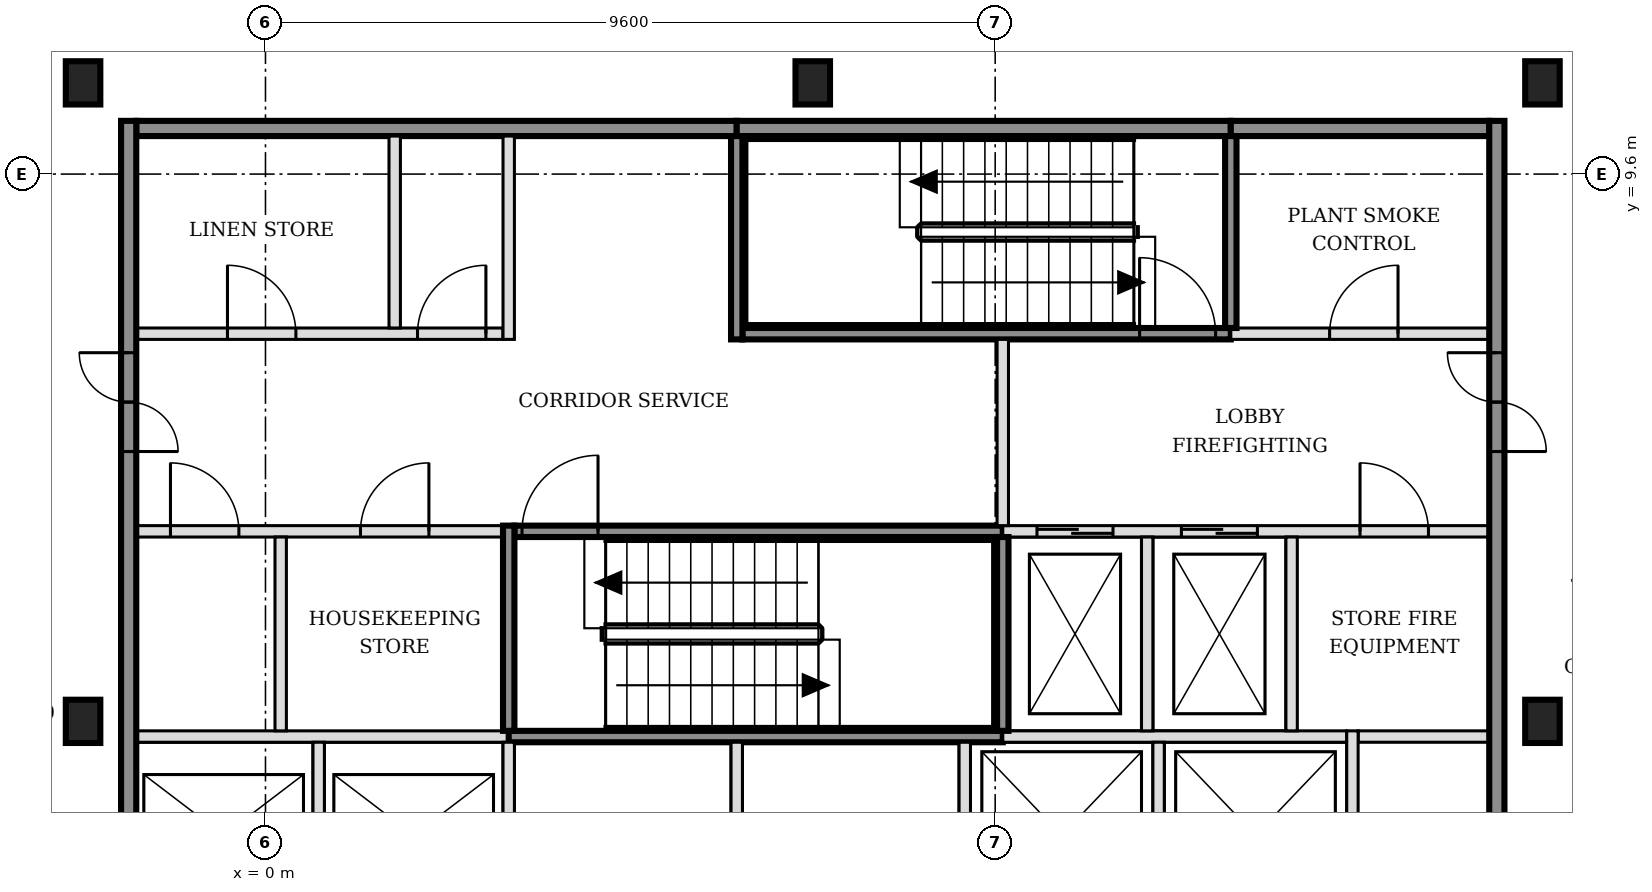
"""IFC4 building model, lengths in metres.
Left out: names, types, materials, properties, quantities, classifications, styles, units other than length and angle.
Written with IfcOpenShell. Run it as: python <this file> out.ifc"""

import sys

from ifc_helpers import new_model, si_unit, direction, frame, frame_2d, origin, origin_2d, place, context, subcontext, project, spatial, rectangle, i_section, extrude, element, fill, save


model = new_model("IFC4")
c1 = context("Model", 3, precision=1e-05, world=origin(), true_north=direction((0.0, 1.0)))
c2 = subcontext(c1, "Body", "Model", "MODEL_VIEW")
j1 = project(units=[si_unit("LENGTHUNIT", "METRE"), si_unit("PLANEANGLEUNIT", "RADIAN")], contexts=[c1])
p1 = place(None, origin())
s1 = spatial("IfcSite", under=j1, at=p1, CompositionType="ELEMENT")
p2 = place(p1, origin())
s2 = spatial("IfcBuilding", under=s1, at=p2, CompositionType="ELEMENT")
p3 = place(p2, frame((0.0, 0.0, 54.6)))
s3 = spatial("IfcBuildingStorey", under=s2, at=p3, CompositionType="ELEMENT", Elevation=54.6)
for number, where, z_axis, x_axis in (
    (1, (-2.4, 2.4, -0.15), (0.0, 0.0, 1.0), (1.0, 0.0, 0.0)),
    (2, (16.8, 2.4, -0.15), (0.0, 0.0, 1.0), (1.0, 0.0, 0.0)),
    (3, (-2.4, 10.8, -0.15), (0.0, 0.0, 1.0), (1.0, 0.0, 0.0)),
    (4, (7.2, 10.8, -0.15), (0.0, 0.0, 1.0), (1.0, 0.0, 0.0)),
    (5, (16.8, 10.8, -0.15), (0.0, 0.0, 1.0), (1.0, 0.0, 0.0)),
):
    element("IfcColumn", number, at=place(p3, frame(where, z_axis=z_axis, x_axis=x_axis)), inside=s3, PredefinedType="COLUMN", context=c2, shape_type="SweptSolid", body=[
        extrude(i_section(OverallWidth=0.454, OverallDepth=0.569, WebThickness=0.078, FlangeThickness=0.125, FilletRadius=0.015, at=origin_2d()), origin(), (0.0, 0.0, 1.0), 3.6),
    ])
p4 = place(p3, frame((-1.7, 2.2, 0.0), z_axis=(0.0, 0.0, 1.0), x_axis=(1.0, 0.0, 0.0)))
e6 = element("IfcWall", 6, at=p4, inside=s3, PredefinedType="SOLIDWALL", context=c2, shape_type="SweptSolid", body=[
    extrude(rectangle(XDim=4.9, YDim=0.15, at=frame_2d((2.45, 0.0))), origin(), (0.0, 0.0, 1.0), 3.45),
])
p5 = place(p3, frame((3.2, 2.2, 0.0), z_axis=(0.0, 0.0, 1.0), x_axis=(1.0, 0.0, 0.0)))
e7 = element("IfcWall", 7, at=p5, inside=s3, PredefinedType="SOLIDWALL", context=c2, shape_type="SweptSolid", body=[
    extrude(rectangle(XDim=6.5, YDim=0.15, at=frame_2d((3.25, 0.0))), origin(), (0.0, 0.0, 1.0), 3.45),
])
p6 = place(p3, frame((9.7, 2.2, 0.0), z_axis=(0.0, 0.0, 1.0), x_axis=(1.0, 0.0, 0.0)))
e8 = element("IfcWall", 8, at=p6, inside=s3, PredefinedType="SOLIDWALL", context=c2, shape_type="SweptSolid", body=[
    extrude(rectangle(XDim=4.525, YDim=0.15, at=frame_2d((2.263, 0.0))), origin(), (0.0, 0.0, 1.0), 3.45),
])
p7 = place(p3, frame((14.375, 2.2, 0.0), z_axis=(0.0, 0.0, 1.0), x_axis=(1.0, 0.0, 0.0)))
e9 = element("IfcWall", 9, at=p7, inside=s3, PredefinedType="PARTITIONING", context=c2, shape_type="SweptSolid", body=[
    extrude(rectangle(XDim=1.725, YDim=0.15, at=frame_2d((0.863, 0.0))), origin(), (0.0, 0.0, 1.0), 3.45),
])
p8 = place(p3, frame((-1.7, 4.9, 0.0), z_axis=(0.0, 0.0, 1.0), x_axis=(1.0, 0.0, 0.0)))
e10 = element("IfcWall", 10, at=p8, inside=s3, PredefinedType="PARTITIONING", context=c2, shape_type="SweptSolid", body=[
    extrude(rectangle(XDim=4.825, YDim=0.15, at=frame_2d((2.413, 0.0))), origin(), (0.0, 0.0, 1.0), 3.45),
])
p9 = place(p8, frame((0.45, 0.0, 0.0)))
e11 = element("IfcOpeningElement", 11, at=p9, cuts=e10, PredefinedType="OPENING", context=c2, shape_type="SweptSolid", body=[
    extrude(rectangle(XDim=0.9, YDim=2.1, at=frame_2d((0.45, 1.05))), frame((0.0, 0.085, 0.0), z_axis=(0.0, -1.0, 0.0), x_axis=(1.0, 0.0, 0.0)), (0.0, 0.0, 1.0), 0.17),
])
p10 = place(p8, frame((2.95, 0.0, 0.0)))
e12 = element("IfcOpeningElement", 12, at=p10, cuts=e10, PredefinedType="OPENING", context=c2, shape_type="SweptSolid", body=[
    extrude(rectangle(XDim=0.9, YDim=2.1, at=frame_2d((0.45, 1.05))), frame((0.0, 0.085, 0.0), z_axis=(0.0, -1.0, 0.0), x_axis=(1.0, 0.0, 0.0)), (0.0, 0.0, 1.0), 0.17),
])
p11 = place(p3, frame((3.275, 4.9, 0.0), z_axis=(0.0, 0.0, 1.0), x_axis=(1.0, 0.0, 0.0)))
e13 = element("IfcWall", 13, at=p11, inside=s3, PredefinedType="SOLIDWALL", context=c2, shape_type="SweptSolid", body=[
    extrude(rectangle(XDim=6.425, YDim=0.15, at=frame_2d((3.212, 0.0))), origin(), (0.0, 0.0, 1.0), 3.45),
])
p12 = place(p11, frame((0.1, 0.0, 0.0)))
e14 = element("IfcOpeningElement", 14, at=p12, cuts=e13, PredefinedType="OPENING", context=c2, shape_type="SweptSolid", body=[
    extrude(rectangle(XDim=1.0, YDim=2.1, at=frame_2d((0.5, 1.05))), frame((0.0, 0.085, 0.0), z_axis=(0.0, -1.0, 0.0), x_axis=(1.0, 0.0, 0.0)), (0.0, 0.0, 1.0), 0.17),
])
p13 = place(p3, frame((9.7, 4.9, 0.0), z_axis=(0.0, 0.0, 1.0), x_axis=(1.0, 0.0, 0.0)))
e15 = element("IfcWall", 15, at=p13, inside=s3, PredefinedType="SOLIDWALL", context=c2, shape_type="SweptSolid", body=[
    extrude(rectangle(XDim=6.4, YDim=0.15, at=frame_2d((3.2, 0.0))), origin(), (0.0, 0.0, 1.0), 3.45),
])
p14 = place(p13, frame((0.45, 0.0, 0.0)))
e16 = element("IfcOpeningElement", 16, at=p14, cuts=e15, PredefinedType="OPENING", context=c2, shape_type="SweptSolid", body=[
    extrude(rectangle(XDim=1.0, YDim=2.1, at=frame_2d((0.5, 1.05))), frame((0.0, 0.085, 0.0), z_axis=(0.0, -1.0, 0.0), x_axis=(1.0, 0.0, 0.0)), (0.0, 0.0, 1.0), 0.17),
])
p15 = place(p13, frame((2.35, 0.0, 0.0)))
e17 = element("IfcOpeningElement", 17, at=p15, cuts=e15, PredefinedType="OPENING", context=c2, shape_type="SweptSolid", body=[
    extrude(rectangle(XDim=1.0, YDim=2.1, at=frame_2d((0.5, 1.05))), frame((0.0, 0.085, 0.0), z_axis=(0.0, -1.0, 0.0), x_axis=(1.0, 0.0, 0.0)), (0.0, 0.0, 1.0), 0.17),
])
p16 = place(p13, frame((4.7, 0.0, 0.0)))
e18 = element("IfcOpeningElement", 18, at=p16, cuts=e15, PredefinedType="OPENING", context=c2, shape_type="SweptSolid", body=[
    extrude(rectangle(XDim=0.9, YDim=2.1, at=frame_2d((0.45, 1.05))), frame((0.0, 0.085, 0.0), z_axis=(0.0, -1.0, 0.0), x_axis=(1.0, 0.0, 0.0)), (0.0, 0.0, 1.0), 0.17),
])
p17 = place(p3, frame((-1.7, 7.5, 0.0), z_axis=(0.0, 0.0, 1.0), x_axis=(1.0, 0.0, 0.0)))
e19 = element("IfcWall", 19, at=p17, inside=s3, PredefinedType="PARTITIONING", context=c2, shape_type="SweptSolid", body=[
    extrude(rectangle(XDim=4.825, YDim=0.15, at=frame_2d((2.413, 0.0))), origin(), (0.0, 0.0, 1.0), 3.45),
])
p18 = place(p17, frame((1.2, 0.0, 0.0)))
e20 = element("IfcOpeningElement", 20, at=p18, cuts=e19, PredefinedType="OPENING", context=c2, shape_type="SweptSolid", body=[
    extrude(rectangle(XDim=0.9, YDim=2.1, at=frame_2d((0.45, 1.05))), frame((0.0, 0.085, 0.0), z_axis=(0.0, -1.0, 0.0), x_axis=(1.0, 0.0, 0.0)), (0.0, 0.0, 1.0), 0.17),
])
p19 = place(p17, frame((3.7, 0.0, 0.0)))
e21 = element("IfcOpeningElement", 21, at=p19, cuts=e19, PredefinedType="OPENING", context=c2, shape_type="SweptSolid", body=[
    extrude(rectangle(XDim=0.9, YDim=2.1, at=frame_2d((0.45, 1.05))), frame((0.0, 0.085, 0.0), z_axis=(0.0, -1.0, 0.0), x_axis=(1.0, 0.0, 0.0)), (0.0, 0.0, 1.0), 0.17),
])
p20 = place(p3, frame((6.275, 7.5, 0.0), z_axis=(0.0, 0.0, 1.0), x_axis=(1.0, 0.0, 0.0)))
e22 = element("IfcWall", 22, at=p20, inside=s3, PredefinedType="SOLIDWALL", context=c2, shape_type="SweptSolid", body=[
    extrude(rectangle(XDim=6.425, YDim=0.15, at=frame_2d((3.212, 0.0))), origin(), (0.0, 0.0, 1.0), 3.45),
])
p21 = place(p20, frame((5.225, 0.0, 0.0)))
e23 = element("IfcOpeningElement", 23, at=p21, cuts=e22, PredefinedType="OPENING", context=c2, shape_type="SweptSolid", body=[
    extrude(rectangle(XDim=1.0, YDim=2.1, at=frame_2d((0.5, 1.05))), frame((0.0, 0.085, 0.0), z_axis=(0.0, -1.0, 0.0), x_axis=(1.0, 0.0, 0.0)), (0.0, 0.0, 1.0), 0.17),
])
p22 = place(p3, frame((12.7, 7.5, 0.0), z_axis=(0.0, 0.0, 1.0), x_axis=(1.0, 0.0, 0.0)))
e24 = element("IfcWall", 24, at=p22, inside=s3, PredefinedType="SOLIDWALL", context=c2, shape_type="SweptSolid", body=[
    extrude(rectangle(XDim=3.4, YDim=0.15, at=frame_2d((1.7, 0.0))), origin(), (0.0, 0.0, 1.0), 3.45),
])
p23 = place(p22, frame((1.3, 0.0, 0.0)))
e25 = element("IfcOpeningElement", 25, at=p23, cuts=e24, PredefinedType="OPENING", context=c2, shape_type="SweptSolid", body=[
    extrude(rectangle(XDim=0.9, YDim=2.1, at=frame_2d((0.45, 1.05))), frame((0.0, 0.085, 0.0), z_axis=(0.0, -1.0, 0.0), x_axis=(1.0, 0.0, 0.0)), (0.0, 0.0, 1.0), 0.17),
])
p24 = place(p3, frame((-1.7, 10.2, 0.0), z_axis=(0.0, 0.0, 1.0), x_axis=(1.0, 0.0, 0.0)))
e26 = element("IfcWall", 26, at=p24, inside=s3, PredefinedType="SOLIDWALL", context=c2, shape_type="SweptSolid", body=[
    extrude(rectangle(XDim=7.9, YDim=0.2, at=frame_2d((3.95, 0.0))), origin(), (0.0, 0.0, 1.0), 3.45),
])
p25 = place(p3, frame((6.2, 10.2, 0.0), z_axis=(0.0, 0.0, 1.0), x_axis=(1.0, 0.0, 0.0)))
e27 = element("IfcWall", 27, at=p25, inside=s3, PredefinedType="SOLIDWALL", context=c2, shape_type="SweptSolid", body=[
    extrude(rectangle(XDim=6.5, YDim=0.2, at=frame_2d((3.25, 0.0))), origin(), (0.0, 0.0, 1.0), 3.45),
])
p26 = place(p3, frame((12.7, 10.2, 0.0), z_axis=(0.0, 0.0, 1.0), x_axis=(1.0, 0.0, 0.0)))
e28 = element("IfcWall", 28, at=p26, inside=s3, PredefinedType="SOLIDWALL", context=c2, shape_type="SweptSolid", body=[
    extrude(rectangle(XDim=3.4, YDim=0.2, at=frame_2d((1.7, 0.0))), origin(), (0.0, 0.0, 1.0), 3.45),
])
p27 = place(p3, frame((-1.8, -5.5, 0.0), z_axis=(0.0, 0.0, 1.0), x_axis=(0.0, 1.0, 0.0)))
e29 = element("IfcWall", 29, at=p27, inside=s3, PredefinedType="SOLIDWALL", context=c2, shape_type="SweptSolid", body=[
    extrude(rectangle(XDim=15.8, YDim=0.2, at=frame_2d((7.9, 0.0))), origin(), (0.0, 0.0, 1.0), 3.45),
])
p28 = place(p27, frame((3.05, 0.0, 0.0)))
e30 = element("IfcOpeningElement", 30, at=p28, cuts=e29, PredefinedType="OPENING", context=c2, shape_type="SweptSolid", body=[
    extrude(rectangle(XDim=1.3, YDim=2.1, at=frame_2d((0.65, 1.05))), frame((0.0, 0.11, 0.0), z_axis=(0.0, -1.0, 0.0), x_axis=(1.0, 0.0, 0.0)), (0.0, 0.0, 1.0), 0.22),
])
p29 = place(p27, frame((11.45, 0.0, 0.0)))
e31 = element("IfcOpeningElement", 31, at=p29, cuts=e29, PredefinedType="OPENING", context=c2, shape_type="SweptSolid", body=[
    extrude(rectangle(XDim=1.3, YDim=2.1, at=frame_2d((0.65, 1.05))), frame((0.0, 0.11, 0.0), z_axis=(0.0, -1.0, 0.0), x_axis=(1.0, 0.0, 0.0)), (0.0, 0.0, 1.0), 0.22),
])
p30 = place(p3, frame((0.2, 2.275, 0.0), z_axis=(0.0, 0.0, 1.0), x_axis=(0.0, 1.0, 0.0)))
e32 = element("IfcWall", 32, at=p30, inside=s3, PredefinedType="PARTITIONING", context=c2, shape_type="SweptSolid", body=[
    extrude(rectangle(XDim=2.55, YDim=0.15, at=frame_2d((1.275, 0.0))), origin(), (0.0, 0.0, 1.0), 3.45),
])
p31 = place(p3, frame((0.7, -0.325, 0.0), z_axis=(0.0, 0.0, 1.0), x_axis=(0.0, 1.0, 0.0)))
e33 = element("IfcWall", 33, at=p31, inside=s3, PredefinedType="SOLIDWALL", context=c2, shape_type="SweptSolid", body=[
    extrude(rectangle(XDim=2.45, YDim=0.15, at=frame_2d((1.225, 0.0))), origin(), (0.0, 0.0, 1.0), 3.45),
])
p32 = place(p3, frame((1.7, 7.575, 0.0), z_axis=(0.0, 0.0, 1.0), x_axis=(0.0, 1.0, 0.0)))
e34 = element("IfcWall", 34, at=p32, inside=s3, PredefinedType="PARTITIONING", context=c2, shape_type="SweptSolid", body=[
    extrude(rectangle(XDim=2.525, YDim=0.15, at=frame_2d((1.263, 0.0))), origin(), (0.0, 0.0, 1.0), 3.45),
])
p33 = place(p3, frame((3.2, -0.325, 0.0), z_axis=(0.0, 0.0, 1.0), x_axis=(0.0, 1.0, 0.0)))
e35 = element("IfcWall", 35, at=p33, inside=s3, PredefinedType="SOLIDWALL", context=c2, shape_type="SweptSolid", body=[
    extrude(rectangle(XDim=2.45, YDim=0.15, at=frame_2d((1.225, 0.0))), origin(), (0.0, 0.0, 1.0), 3.45),
])
p34 = place(p3, frame((3.2, 2.275, 0.0), z_axis=(0.0, 0.0, 1.0), x_axis=(0.0, 1.0, 0.0)))
e36 = element("IfcWall", 36, at=p34, inside=s3, PredefinedType="SOLIDWALL", context=c2, shape_type="SweptSolid", body=[
    extrude(rectangle(XDim=2.7, YDim=0.15, at=frame_2d((1.35, 0.0))), origin(), (0.0, 0.0, 1.0), 3.45),
])
p35 = place(p3, frame((3.2, 7.425, 0.0), z_axis=(0.0, 0.0, 1.0), x_axis=(0.0, 1.0, 0.0)))
e37 = element("IfcWall", 37, at=p35, inside=s3, PredefinedType="PARTITIONING", context=c2, shape_type="SweptSolid", body=[
    extrude(rectangle(XDim=2.675, YDim=0.15, at=frame_2d((1.337, 0.0))), origin(), (0.0, 0.0, 1.0), 3.45),
])
p36 = place(p3, frame((6.2, -0.325, 0.0), z_axis=(0.0, 0.0, 1.0), x_axis=(0.0, 1.0, 0.0)))
e38 = element("IfcWall", 38, at=p36, inside=s3, PredefinedType="SOLIDWALL", context=c2, shape_type="SweptSolid", body=[
    extrude(rectangle(XDim=2.45, YDim=0.15, at=frame_2d((1.225, 0.0))), origin(), (0.0, 0.0, 1.0), 3.45),
])
p37 = place(p3, frame((6.2, 7.425, 0.0), z_axis=(0.0, 0.0, 1.0), x_axis=(0.0, 1.0, 0.0)))
e39 = element("IfcWall", 39, at=p37, inside=s3, PredefinedType="SOLIDWALL", context=c2, shape_type="SweptSolid", body=[
    extrude(rectangle(XDim=2.675, YDim=0.15, at=frame_2d((1.337, 0.0))), origin(), (0.0, 0.0, 1.0), 3.45),
])
p38 = place(p3, frame((9.2, -0.325, 0.0), z_axis=(0.0, 0.0, 1.0), x_axis=(0.0, 1.0, 0.0)))
e40 = element("IfcWall", 40, at=p38, inside=s3, PredefinedType="SOLIDWALL", context=c2, shape_type="SweptSolid", body=[
    extrude(rectangle(XDim=2.45, YDim=0.15, at=frame_2d((1.225, 0.0))), origin(), (0.0, 0.0, 1.0), 3.45),
])
p39 = place(p3, frame((9.7, 2.275, 0.0), z_axis=(0.0, 0.0, 1.0), x_axis=(0.0, 1.0, 0.0)))
e41 = element("IfcWall", 41, at=p39, inside=s3, PredefinedType="SOLIDWALL", context=c2, shape_type="SweptSolid", body=[
    extrude(rectangle(XDim=2.55, YDim=0.15, at=frame_2d((1.275, 0.0))), origin(), (0.0, 0.0, 1.0), 3.45),
])
p40 = place(p3, frame((9.7, 4.975, 0.0), z_axis=(0.0, 0.0, 1.0), x_axis=(0.0, 1.0, 0.0)))
e42 = element("IfcWall", 42, at=p40, inside=s3, PredefinedType="SOLIDWALL", context=c2, shape_type="SweptSolid", body=[
    extrude(rectangle(XDim=2.45, YDim=0.15, at=frame_2d((1.225, 0.0))), origin(), (0.0, 0.0, 1.0), 3.45),
])
p41 = place(p3, frame((11.6, 2.275, 0.0), z_axis=(0.0, 0.0, 1.0), x_axis=(0.0, 1.0, 0.0)))
e43 = element("IfcWall", 43, at=p41, inside=s3, PredefinedType="SOLIDWALL", context=c2, shape_type="SweptSolid", body=[
    extrude(rectangle(XDim=2.55, YDim=0.15, at=frame_2d((1.275, 0.0))), origin(), (0.0, 0.0, 1.0), 3.45),
])
p42 = place(p3, frame((11.75, -0.325, 0.0), z_axis=(0.0, 0.0, 1.0), x_axis=(0.0, 1.0, 0.0)))
e44 = element("IfcWall", 44, at=p42, inside=s3, PredefinedType="SOLIDWALL", context=c2, shape_type="SweptSolid", body=[
    extrude(rectangle(XDim=2.45, YDim=0.15, at=frame_2d((1.225, 0.0))), origin(), (0.0, 0.0, 1.0), 3.45),
])
p43 = place(p3, frame((12.7, 7.575, 0.0), z_axis=(0.0, 0.0, 1.0), x_axis=(0.0, 1.0, 0.0)))
e45 = element("IfcWall", 45, at=p43, inside=s3, PredefinedType="SOLIDWALL", context=c2, shape_type="SweptSolid", body=[
    extrude(rectangle(XDim=2.525, YDim=0.15, at=frame_2d((1.263, 0.0))), origin(), (0.0, 0.0, 1.0), 3.45),
])
p44 = place(p3, frame((13.5, 2.275, 0.0), z_axis=(0.0, 0.0, 1.0), x_axis=(0.0, 1.0, 0.0)))
e46 = element("IfcWall", 46, at=p44, inside=s3, PredefinedType="SOLIDWALL", context=c2, shape_type="SweptSolid", body=[
    extrude(rectangle(XDim=2.55, YDim=0.15, at=frame_2d((1.275, 0.0))), origin(), (0.0, 0.0, 1.0), 3.45),
])
p45 = place(p3, frame((14.3, -0.475, 0.0), z_axis=(0.0, 0.0, 1.0), x_axis=(0.0, 1.0, 0.0)))
e47 = element("IfcWall", 47, at=p45, inside=s3, PredefinedType="SOLIDWALL", context=c2, shape_type="SweptSolid", body=[
    extrude(rectangle(XDim=2.75, YDim=0.15, at=frame_2d((1.375, 0.0))), origin(), (0.0, 0.0, 1.0), 3.45),
])
p46 = place(p3, frame((16.2, -5.5, 0.0), z_axis=(0.0, 0.0, 1.0), x_axis=(0.0, 1.0, 0.0)))
e48 = element("IfcWall", 48, at=p46, inside=s3, PredefinedType="SOLIDWALL", context=c2, shape_type="SweptSolid", body=[
    extrude(rectangle(XDim=15.8, YDim=0.2, at=frame_2d((7.9, 0.0))), origin(), (0.0, 0.0, 1.0), 3.45),
])
p47 = place(p46, frame((3.05, 0.0, 0.0)))
e49 = element("IfcOpeningElement", 49, at=p47, cuts=e48, PredefinedType="OPENING", context=c2, shape_type="SweptSolid", body=[
    extrude(rectangle(XDim=1.3, YDim=2.1, at=frame_2d((0.65, 1.05))), frame((0.0, 0.11, 0.0), z_axis=(0.0, -1.0, 0.0), x_axis=(1.0, 0.0, 0.0)), (0.0, 0.0, 1.0), 0.22),
])
p48 = place(p46, frame((11.45, 0.0, 0.0)))
e50 = element("IfcOpeningElement", 50, at=p48, cuts=e48, PredefinedType="OPENING", context=c2, shape_type="SweptSolid", body=[
    extrude(rectangle(XDim=1.3, YDim=2.1, at=frame_2d((0.65, 1.05))), frame((0.0, 0.11, 0.0), z_axis=(0.0, -1.0, 0.0), x_axis=(1.0, 0.0, 0.0)), (0.0, 0.0, 1.0), 0.22),
])
p49 = place(p14, origin())
e51 = element("IfcDoor", 51, at=p49, inside=s3, OperationType="DOUBLE_DOOR_SLIDING", PredefinedType="DOOR", context=c2, shape_type="SweptSolid", body=[
    extrude(rectangle(XDim=1.0, YDim=2.1, at=frame_2d((0.5, 1.05))), frame((0.0, 0.025, 0.0), z_axis=(0.0, -1.0, 0.0), x_axis=(1.0, 0.0, 0.0)), (0.0, 0.0, 1.0), 0.05),
])
fill(e16, e51)
p50 = place(p15, origin())
e52 = element("IfcDoor", 52, at=p50, inside=s3, OperationType="DOUBLE_DOOR_SLIDING", PredefinedType="DOOR", context=c2, shape_type="SweptSolid", body=[
    extrude(rectangle(XDim=1.0, YDim=2.1, at=frame_2d((0.5, 1.05))), frame((0.0, 0.025, 0.0), z_axis=(0.0, -1.0, 0.0), x_axis=(1.0, 0.0, 0.0)), (0.0, 0.0, 1.0), 0.05),
])
fill(e17, e52)
p51 = place(p12, origin())
e53 = element("IfcDoor", 53, at=p51, inside=s3, OperationType="SINGLE_SWING_RIGHT", PredefinedType="DOOR", context=c2, shape_type="SweptSolid", body=[
    extrude(rectangle(XDim=1.0, YDim=2.1, at=frame_2d((0.5, 1.05))), frame((0.0, 0.025, 0.0), z_axis=(0.0, -1.0, 0.0), x_axis=(1.0, 0.0, 0.0)), (0.0, 0.0, 1.0), 0.05),
])
fill(e14, e53)
p52 = place(p21, origin())
e54 = element("IfcDoor", 54, at=p52, inside=s3, OperationType="SINGLE_SWING_LEFT", PredefinedType="DOOR", context=c2, shape_type="SweptSolid", body=[
    extrude(rectangle(XDim=1.0, YDim=2.1, at=frame_2d((0.5, 1.05))), frame((0.0, 0.025, 0.0), z_axis=(0.0, -1.0, 0.0), x_axis=(1.0, 0.0, 0.0)), (0.0, 0.0, 1.0), 0.05),
])
fill(e23, e54)
p53 = place(p29, origin())
e55 = element("IfcDoor", 55, at=p53, inside=s3, OperationType="DOUBLE_DOOR_SINGLE_SWING", PredefinedType="DOOR", context=c2, shape_type="SweptSolid", body=[
    extrude(rectangle(XDim=1.3, YDim=2.1, at=frame_2d((0.65, 1.05))), frame((0.0, 0.025, 0.0), z_axis=(0.0, -1.0, 0.0), x_axis=(1.0, 0.0, 0.0)), (0.0, 0.0, 1.0), 0.05),
])
fill(e31, e55)
p54 = place(p48, origin())
e56 = element("IfcDoor", 56, at=p54, inside=s3, OperationType="DOUBLE_DOOR_SINGLE_SWING", PredefinedType="DOOR", context=c2, shape_type="SweptSolid", body=[
    extrude(rectangle(XDim=1.3, YDim=2.1, at=frame_2d((0.65, 1.05))), frame((0.0, 0.025, 0.0), z_axis=(0.0, -1.0, 0.0), x_axis=(1.0, 0.0, 0.0)), (0.0, 0.0, 1.0), 0.05),
])
fill(e50, e56)
p55 = place(p16, origin())
e57 = element("IfcDoor", 57, at=p55, inside=s3, OperationType="SINGLE_SWING_LEFT", PredefinedType="DOOR", context=c2, shape_type="SweptSolid", body=[
    extrude(rectangle(XDim=0.9, YDim=2.1, at=frame_2d((0.45, 1.05))), frame((0.0, 0.025, 0.0), z_axis=(0.0, -1.0, 0.0), x_axis=(1.0, 0.0, 0.0)), (0.0, 0.0, 1.0), 0.05),
])
fill(e18, e57)
p56 = place(p23, origin())
e58 = element("IfcDoor", 58, at=p56, inside=s3, OperationType="SINGLE_SWING_RIGHT", PredefinedType="DOOR", context=c2, shape_type="SweptSolid", body=[
    extrude(rectangle(XDim=0.9, YDim=2.1, at=frame_2d((0.45, 1.05))), frame((0.0, 0.025, 0.0), z_axis=(0.0, -1.0, 0.0), x_axis=(1.0, 0.0, 0.0)), (0.0, 0.0, 1.0), 0.05),
])
fill(e25, e58)
p57 = place(p9, origin())
e59 = element("IfcDoor", 59, at=p57, inside=s3, OperationType="SINGLE_SWING_LEFT", PredefinedType="DOOR", context=c2, shape_type="SweptSolid", body=[
    extrude(rectangle(XDim=0.9, YDim=2.1, at=frame_2d((0.45, 1.05))), frame((0.0, 0.025, 0.0), z_axis=(0.0, -1.0, 0.0), x_axis=(1.0, 0.0, 0.0)), (0.0, 0.0, 1.0), 0.05),
])
fill(e11, e59)
p58 = place(p10, origin())
e60 = element("IfcDoor", 60, at=p58, inside=s3, OperationType="SINGLE_SWING_RIGHT", PredefinedType="DOOR", context=c2, shape_type="SweptSolid", body=[
    extrude(rectangle(XDim=0.9, YDim=2.1, at=frame_2d((0.45, 1.05))), frame((0.0, 0.025, 0.0), z_axis=(0.0, -1.0, 0.0), x_axis=(1.0, 0.0, 0.0)), (0.0, 0.0, 1.0), 0.05),
])
fill(e12, e60)
p59 = place(p18, origin())
e61 = element("IfcDoor", 61, at=p59, inside=s3, OperationType="SINGLE_SWING_LEFT", PredefinedType="DOOR", context=c2, shape_type="SweptSolid", body=[
    extrude(rectangle(XDim=0.9, YDim=2.1, at=frame_2d((0.45, 1.05))), frame((0.0, 0.025, 0.0), z_axis=(0.0, -1.0, 0.0), x_axis=(1.0, 0.0, 0.0)), (0.0, 0.0, 1.0), 0.05),
])
fill(e20, e61)
p60 = place(p19, origin())
e62 = element("IfcDoor", 62, at=p60, inside=s3, OperationType="SINGLE_SWING_RIGHT", PredefinedType="DOOR", context=c2, shape_type="SweptSolid", body=[
    extrude(rectangle(XDim=0.9, YDim=2.1, at=frame_2d((0.45, 1.05))), frame((0.0, 0.025, 0.0), z_axis=(0.0, -1.0, 0.0), x_axis=(1.0, 0.0, 0.0)), (0.0, 0.0, 1.0), 0.05),
])
fill(e21, e62)
save(model, sys.argv[1])
